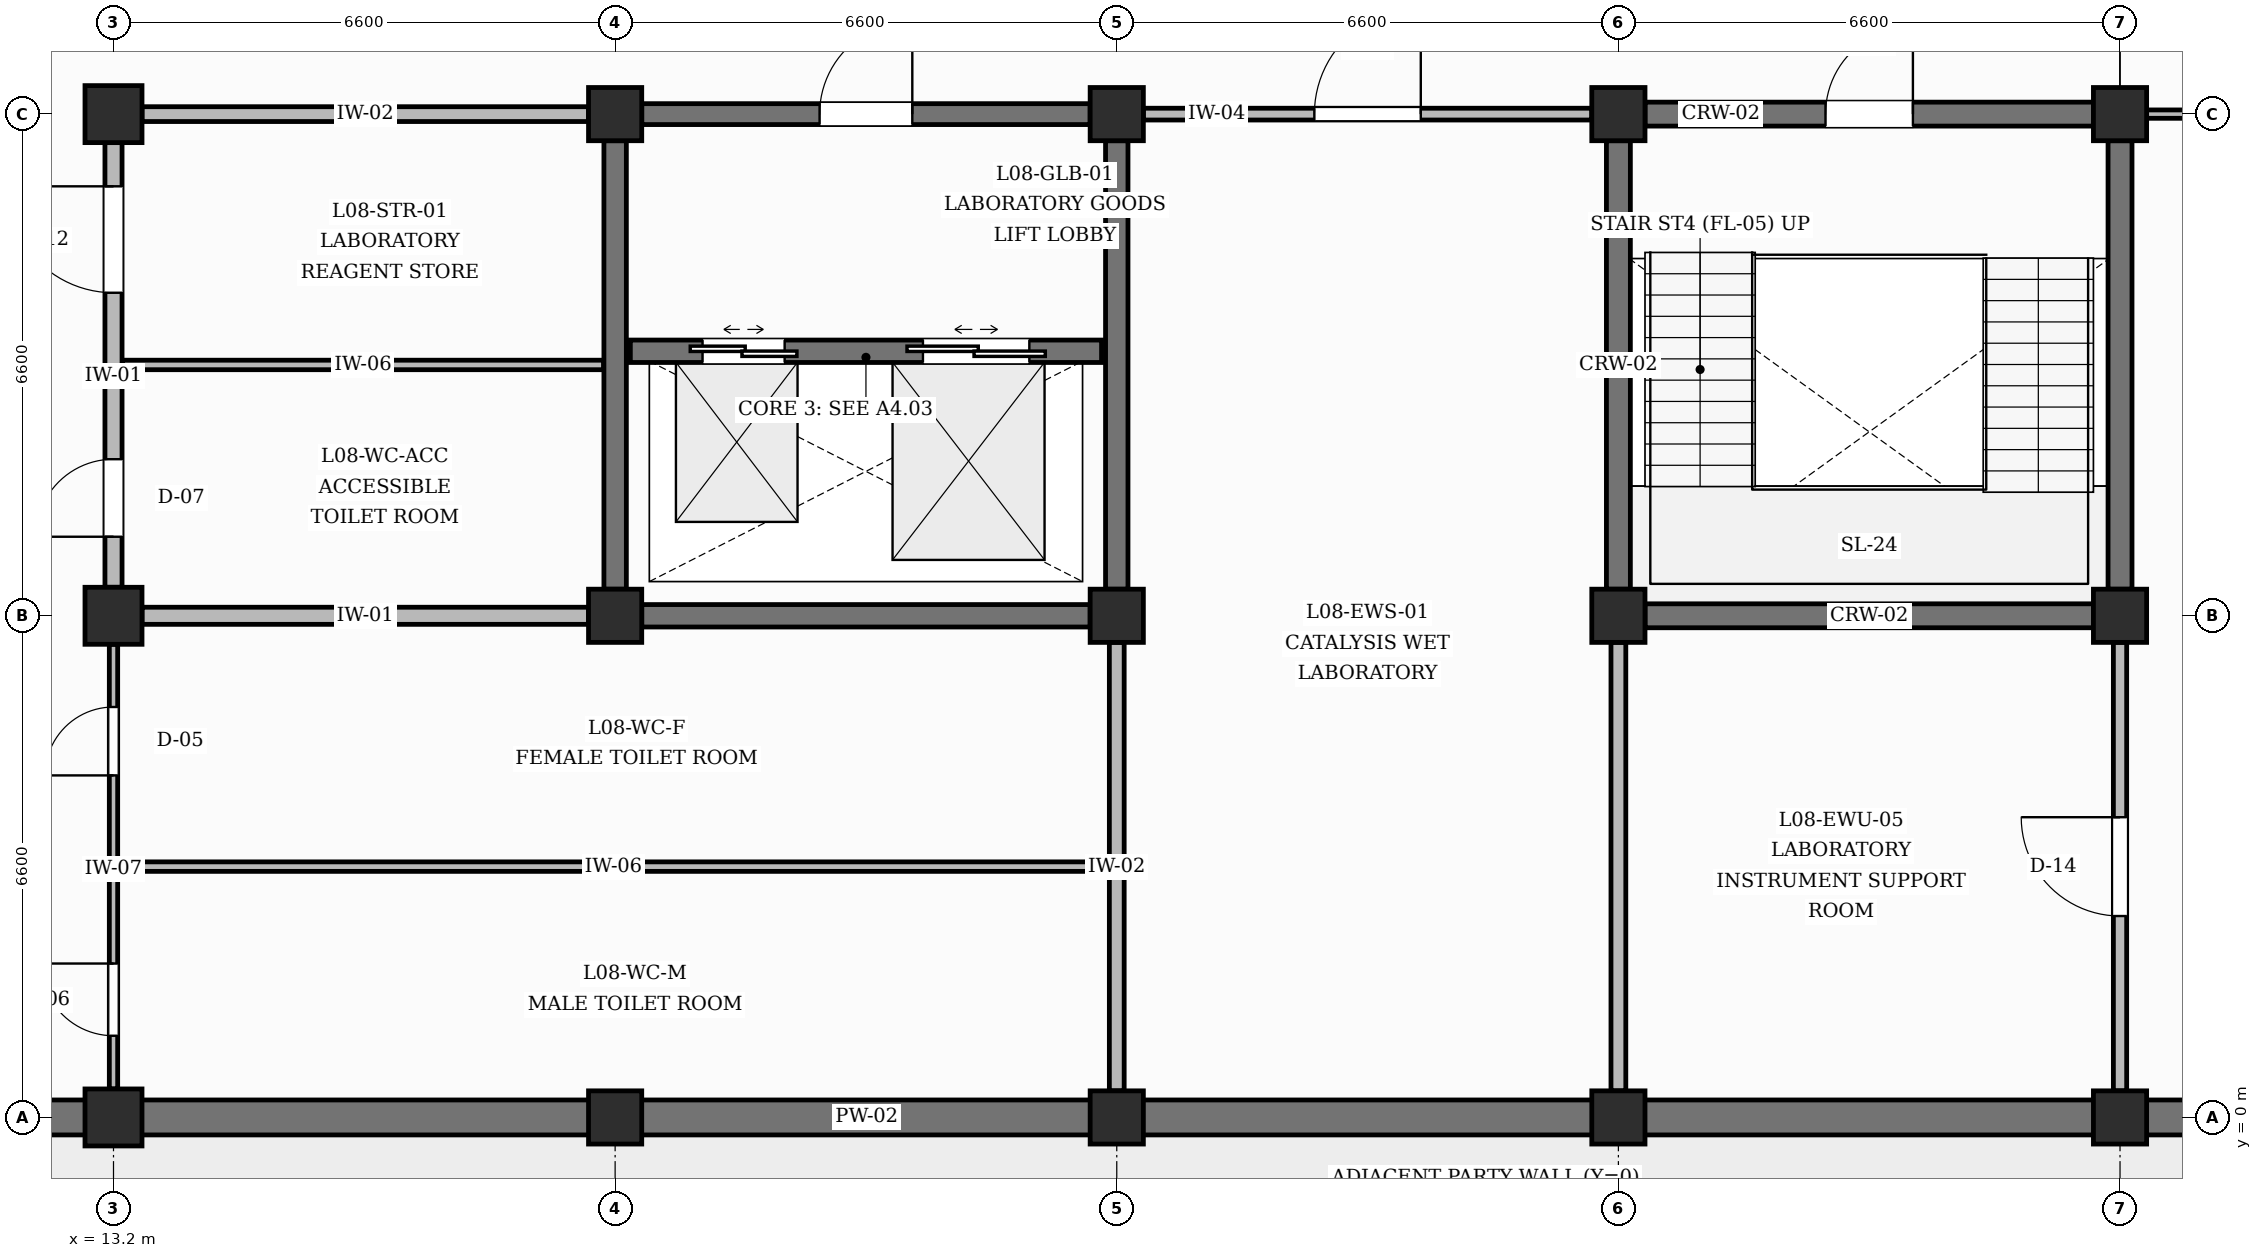
"""IFC4 building model, lengths in metres.
Left out: names, types, materials, properties, quantities, classifications, styles, units other than length and angle.
Written with IfcOpenShell. Run it as: python <this file> out.ifc"""

import sys

from ifc_helpers import new_model, si_unit, direction, frame, frame_2d, origin, origin_2d, place, context, subcontext, project, spatial, rectangle, extrude, element, fill, save


model = new_model("IFC4")
c1 = context("Model", 3, precision=1e-05, world=origin(), true_north=direction((0.0, 1.0)))
c2 = subcontext(c1, "Body", "Model", "MODEL_VIEW")
j1 = project(units=[si_unit("LENGTHUNIT", "METRE"), si_unit("PLANEANGLEUNIT", "RADIAN")], contexts=[c1])
p1 = place(None, origin())
s1 = spatial("IfcSite", under=j1, at=p1, CompositionType="ELEMENT")
p2 = place(p1, origin())
s2 = spatial("IfcBuilding", under=s1, at=p2, CompositionType="ELEMENT")
p3 = place(p2, frame((0.0, 0.0, 35.4)))
s3 = spatial("IfcBuildingStorey", under=s2, at=p3, CompositionType="ELEMENT", Elevation=35.4)
for number, where, z_axis, x_axis in (
    (1, (13.2, 0.0, 0.0), (0.0, 0.0, 1.0), (1.0, 0.0, 0.0)),
    (2, (13.2, 6.6, 0.0), (0.0, 0.0, 1.0), (1.0, 0.0, 0.0)),
    (3, (13.2, 13.2, 0.0), (0.0, 0.0, 1.0), (1.0, 0.0, 0.0)),
):
    element("IfcColumn", number, at=place(p3, frame(where, z_axis=z_axis, x_axis=x_axis)), inside=s3, PredefinedType="COLUMN", context=c2, shape_type="SweptSolid", body=[
        extrude(rectangle(XDim=0.75, YDim=0.75, at=origin_2d()), origin(), (0.0, 0.0, 1.0), 4.2),
    ])
for number, where, z_axis, x_axis in (
    (4, (19.8, 0.0, 0.0), (0.0, 0.0, 1.0), (1.0, 0.0, 0.0)),
    (5, (19.8, 6.6, 0.0), (0.0, 0.0, 1.0), (1.0, 0.0, 0.0)),
    (6, (19.8, 13.2, 0.0), (0.0, 0.0, 1.0), (1.0, 0.0, 0.0)),
    (7, (26.4, 0.0, 0.0), (0.0, 0.0, 1.0), (1.0, 0.0, 0.0)),
    (8, (26.4, 6.6, 0.0), (0.0, 0.0, 1.0), (1.0, 0.0, 0.0)),
    (9, (26.4, 13.2, 0.0), (0.0, 0.0, 1.0), (1.0, 0.0, 0.0)),
    (10, (33.0, 0.0, 0.0), (0.0, 0.0, 1.0), (1.0, 0.0, 0.0)),
    (11, (33.0, 6.6, 0.0), (0.0, 0.0, 1.0), (1.0, 0.0, 0.0)),
    (12, (33.0, 13.2, 0.0), (0.0, 0.0, 1.0), (1.0, 0.0, 0.0)),
    (13, (39.6, 0.0, 0.0), (0.0, 0.0, 1.0), (1.0, 0.0, 0.0)),
    (14, (39.6, 6.6, 0.0), (0.0, 0.0, 1.0), (1.0, 0.0, 0.0)),
    (15, (39.6, 13.2, 0.0), (0.0, 0.0, 1.0), (1.0, 0.0, 0.0)),
):
    element("IfcColumn", number, at=place(p3, frame(where, z_axis=z_axis, x_axis=x_axis)), inside=s3, PredefinedType="COLUMN", context=c2, shape_type="SweptSolid", body=[
        extrude(rectangle(XDim=0.7, YDim=0.7, at=origin_2d()), origin(), (0.0, 0.0, 1.0), 4.2),
    ])
p4 = place(p3, frame((6.975, 0.0, 0.0), z_axis=(0.0, 0.0, 1.0), x_axis=(1.0, 0.0, 0.0)))
e16 = element("IfcWall", 16, at=p4, inside=s3, PredefinedType="SOLIDWALL", context=c2, shape_type="SweptSolid", body=[
    extrude(rectangle(XDim=5.85, YDim=0.46, at=frame_2d((2.925, 0.0))), origin(), (0.0, 0.0, 1.0), 3.28),
])
p5 = place(p3, frame((13.575, 0.0, 0.0), z_axis=(0.0, 0.0, 1.0), x_axis=(1.0, 0.0, 0.0)))
e17 = element("IfcWall", 17, at=p5, inside=s3, PredefinedType="SOLIDWALL", context=c2, shape_type="SweptSolid", body=[
    extrude(rectangle(XDim=5.875, YDim=0.46, at=frame_2d((2.938, 0.0))), origin(), (0.0, 0.0, 1.0), 3.28),
])
p6 = place(p3, frame((20.15, 0.0, 0.0), z_axis=(0.0, 0.0, 1.0), x_axis=(1.0, 0.0, 0.0)))
e18 = element("IfcWall", 18, at=p6, inside=s3, PredefinedType="SOLIDWALL", context=c2, shape_type="SweptSolid", body=[
    extrude(rectangle(XDim=5.9, YDim=0.46, at=frame_2d((2.95, 0.0))), origin(), (0.0, 0.0, 1.0), 3.28),
])
for number, where, z_axis, x_axis in (
    (19, (26.75, 0.0, 0.0), (0.0, 0.0, 1.0), (1.0, 0.0, 0.0)),
    (20, (33.35, 0.0, 0.0), (0.0, 0.0, 1.0), (1.0, 0.0, 0.0)),
):
    element("IfcWall", number, at=place(p3, frame(where, z_axis=z_axis, x_axis=x_axis)), inside=s3, PredefinedType="SOLIDWALL", context=c2, shape_type="SweptSolid", body=[
        extrude(rectangle(XDim=5.9, YDim=0.46, at=frame_2d((2.95, 0.0))), origin(), (0.0, 0.0, 1.0), 3.28),
    ])
p7 = place(p3, frame((39.95, 0.0, 0.0), z_axis=(0.0, 0.0, 1.0), x_axis=(1.0, 0.0, 0.0)))
e21 = element("IfcWall", 21, at=p7, inside=s3, PredefinedType="SOLIDWALL", context=c2, shape_type="SweptSolid", body=[
    extrude(rectangle(XDim=5.9, YDim=0.46, at=frame_2d((2.95, 0.0))), origin(), (0.0, 0.0, 1.0), 3.28),
])
p8 = place(p3, frame((33.35, 6.6, 0.0), z_axis=(0.0, 0.0, 1.0), x_axis=(1.0, 0.0, 0.0)))
e22 = element("IfcWall", 22, at=p8, inside=s3, PredefinedType="SHEAR", context=c2, shape_type="SweptSolid", body=[
    extrude(rectangle(XDim=5.9, YDim=0.315, at=frame_2d((2.95, 0.0))), origin(), (0.0, 0.0, 1.0), 3.18),
])
p9 = place(p3, frame((33.35, 13.2, 0.0), z_axis=(0.0, 0.0, 1.0), x_axis=(1.0, 0.0, 0.0)))
e23 = element("IfcWall", 23, at=p9, inside=s3, PredefinedType="SHEAR", context=c2, shape_type="SweptSolid", body=[
    extrude(rectangle(XDim=5.9, YDim=0.315, at=frame_2d((2.95, 0.0))), origin(), (0.0, 0.0, 1.0), 3.18),
])
p10 = place(p9, frame((2.375, 0.0, 0.0)))
e24 = element("IfcOpeningElement", 24, at=p10, cuts=e23, PredefinedType="OPENING", context=c2, shape_type="SweptSolid", body=[
    extrude(rectangle(XDim=1.15, YDim=2.2, at=frame_2d((0.575, 1.1))), frame((0.0, 0.167, 0.0), z_axis=(0.0, -1.0, 0.0), x_axis=(1.0, 0.0, 0.0)), (0.0, 0.0, 1.0), 0.335),
])
for number, where, z_axis, x_axis in (
    (25, (33.0, 6.95, 0.0), (0.0, 0.0, 1.0), (0.0, 1.0, 0.0)),
    (26, (39.6, 6.95, 0.0), (0.0, 0.0, 1.0), (0.0, 1.0, 0.0)),
):
    element("IfcWall", number, at=place(p3, frame(where, z_axis=z_axis, x_axis=x_axis)), inside=s3, PredefinedType="SHEAR", context=c2, shape_type="SweptSolid", body=[
        extrude(rectangle(XDim=5.9, YDim=0.315, at=frame_2d((2.95, 0.0))), origin(), (0.0, 0.0, 1.0), 3.18),
    ])
for number, where, z_axis, x_axis in (
    (27, (20.15, 6.6, 0.0), (0.0, 0.0, 1.0), (1.0, 0.0, 0.0)),
    (28, (19.8, 6.95, 0.0), (0.0, 0.0, 1.0), (0.0, 1.0, 0.0)),
    (29, (26.4, 6.95, 0.0), (0.0, 0.0, 1.0), (0.0, 1.0, 0.0)),
):
    element("IfcWall", number, at=place(p3, frame(where, z_axis=z_axis, x_axis=x_axis)), inside=s3, PredefinedType="SHEAR", context=c2, shape_type="SweptSolid", body=[
        extrude(rectangle(XDim=5.9, YDim=0.295, at=frame_2d((2.95, 0.0))), origin(), (0.0, 0.0, 1.0), 3.18),
    ])
p11 = place(p3, frame((20.15, 13.2, 0.0), z_axis=(0.0, 0.0, 1.0), x_axis=(1.0, 0.0, 0.0)))
e30 = element("IfcWall", 30, at=p11, inside=s3, PredefinedType="SHEAR", context=c2, shape_type="SweptSolid", body=[
    extrude(rectangle(XDim=5.9, YDim=0.275, at=frame_2d((2.95, 0.0))), origin(), (0.0, 0.0, 1.0), 3.18),
])
p12 = place(p11, frame((2.34, 0.0, 0.0)))
e31 = element("IfcOpeningElement", 31, at=p12, cuts=e30, PredefinedType="OPENING", context=c2, shape_type="SweptSolid", body=[
    extrude(rectangle(XDim=1.22, YDim=2.15, at=frame_2d((0.61, 1.075))), frame((0.0, 0.147, 0.0), z_axis=(0.0, -1.0, 0.0), x_axis=(1.0, 0.0, 0.0)), (0.0, 0.0, 1.0), 0.295),
])
p13 = place(p3, frame((20.0, 10.08, 0.0), z_axis=(0.0, 0.0, 1.0), x_axis=(1.0, 0.0, 0.0)))
e32 = element("IfcWall", 32, at=p13, inside=s3, PredefinedType="SHEAR", context=c2, shape_type="SweptSolid", body=[
    extrude(rectangle(XDim=6.2, YDim=0.295, at=frame_2d((3.1, 0.0))), origin(), (0.0, 0.0, 1.0), 3.88),
])
p14 = place(p13, frame((0.95, 0.0, 0.0)))
e33 = element("IfcOpeningElement", 33, at=p14, cuts=e32, PredefinedType="OPENING", context=c2, shape_type="SweptSolid", body=[
    extrude(rectangle(XDim=1.08, YDim=2.15, at=frame_2d((0.54, 1.075))), frame((0.0, 0.157, 0.0), z_axis=(0.0, -1.0, 0.0), x_axis=(1.0, 0.0, 0.0)), (0.0, 0.0, 1.0), 0.315),
])
p15 = place(p13, frame((3.85, 0.0, 0.0)))
e34 = element("IfcOpeningElement", 34, at=p15, cuts=e32, PredefinedType="OPENING", context=c2, shape_type="SweptSolid", body=[
    extrude(rectangle(XDim=1.4, YDim=2.35, at=frame_2d((0.7, 1.175))), frame((0.0, 0.157, 0.0), z_axis=(0.0, -1.0, 0.0), x_axis=(1.0, 0.0, 0.0)), (0.0, 0.0, 1.0), 0.315),
])
p16 = place(p3, frame((13.2, 0.375, 0.0), z_axis=(0.0, 0.0, 1.0), x_axis=(0.0, 1.0, 0.0)))
e35 = element("IfcWall", 35, at=p16, inside=s3, PredefinedType="PARTITIONING", context=c2, shape_type="SweptSolid", body=[
    extrude(rectangle(XDim=5.85, YDim=0.11, at=frame_2d((2.925, 0.0))), origin(), (0.0, 0.0, 1.0), 3.18),
])
p17 = place(p16, frame((0.7, 0.0, 0.0)))
e36 = element("IfcOpeningElement", 36, at=p17, cuts=e35, PredefinedType="OPENING", context=c2, shape_type="SweptSolid", body=[
    extrude(rectangle(XDim=0.95, YDim=2.1, at=frame_2d((0.475, 1.05))), frame((0.0, 0.065, 0.0), z_axis=(0.0, -1.0, 0.0), x_axis=(1.0, 0.0, 0.0)), (0.0, 0.0, 1.0), 0.13),
])
p18 = place(p16, frame((4.125, 0.0, 0.0)))
e37 = element("IfcOpeningElement", 37, at=p18, cuts=e35, PredefinedType="OPENING", context=c2, shape_type="SweptSolid", body=[
    extrude(rectangle(XDim=0.9, YDim=2.1, at=frame_2d((0.45, 1.05))), frame((0.0, 0.065, 0.0), z_axis=(0.0, -1.0, 0.0), x_axis=(1.0, 0.0, 0.0)), (0.0, 0.0, 1.0), 0.13),
])
p19 = place(p3, frame((26.4, 0.35, 0.0), z_axis=(0.0, 0.0, 1.0), x_axis=(0.0, 1.0, 0.0)))
e38 = element("IfcWall", 38, at=p19, inside=s3, PredefinedType="PARTITIONING", context=c2, shape_type="SweptSolid", body=[
    extrude(rectangle(XDim=5.9, YDim=0.195, at=frame_2d((2.95, 0.0))), origin(), (0.0, 0.0, 1.0), 3.18),
])
p20 = place(p3, frame((13.575, 6.6, 0.0), z_axis=(0.0, 0.0, 1.0), x_axis=(1.0, 0.0, 0.0)))
e39 = element("IfcWall", 39, at=p20, inside=s3, PredefinedType="PARTITIONING", context=c2, shape_type="SweptSolid", body=[
    extrude(rectangle(XDim=5.875, YDim=0.225, at=frame_2d((2.938, 0.0))), origin(), (0.0, 0.0, 1.0), 3.18),
])
p21 = place(p3, frame((13.2, 6.975, 0.0), z_axis=(0.0, 0.0, 1.0), x_axis=(0.0, 1.0, 0.0)))
e40 = element("IfcWall", 40, at=p21, inside=s3, PredefinedType="PARTITIONING", context=c2, shape_type="SweptSolid", body=[
    extrude(rectangle(XDim=5.85, YDim=0.225, at=frame_2d((2.925, 0.0))), origin(), (0.0, 0.0, 1.0), 3.18),
])
p22 = place(p21, frame((0.665, 0.0, 0.0)))
e41 = element("IfcOpeningElement", 41, at=p22, cuts=e40, PredefinedType="OPENING", context=c2, shape_type="SweptSolid", body=[
    extrude(rectangle(XDim=1.02, YDim=2.15, at=frame_2d((0.51, 1.075))), frame((0.0, 0.123, 0.0), z_axis=(0.0, -1.0, 0.0), x_axis=(1.0, 0.0, 0.0)), (0.0, 0.0, 1.0), 0.245),
])
p23 = place(p21, frame((3.875, 0.0, 0.0)))
e42 = element("IfcOpeningElement", 42, at=p23, cuts=e40, PredefinedType="OPENING", context=c2, shape_type="SweptSolid", body=[
    extrude(rectangle(XDim=1.4, YDim=2.25, at=frame_2d((0.7, 1.125))), frame((0.0, 0.123, 0.0), z_axis=(0.0, -1.0, 0.0), x_axis=(1.0, 0.0, 0.0)), (0.0, 0.0, 1.0), 0.245),
])
p24 = place(p3, frame((13.575, 13.2, 0.0), z_axis=(0.0, 0.0, 1.0), x_axis=(1.0, 0.0, 0.0)))
e43 = element("IfcWall", 43, at=p24, inside=s3, PredefinedType="PARTITIONING", context=c2, shape_type="SweptSolid", body=[
    extrude(rectangle(XDim=5.875, YDim=0.195, at=frame_2d((2.938, 0.0))), origin(), (0.0, 0.0, 1.0), 3.18),
])
p25 = place(p3, frame((33.0, 0.35, 0.0), z_axis=(0.0, 0.0, 1.0), x_axis=(0.0, 1.0, 0.0)))
e44 = element("IfcWall", 44, at=p25, inside=s3, PredefinedType="PARTITIONING", context=c2, shape_type="SweptSolid", body=[
    extrude(rectangle(XDim=5.9, YDim=0.195, at=frame_2d((2.95, 0.0))), origin(), (0.0, 0.0, 1.0), 3.18),
])
p26 = place(p3, frame((26.75, 13.2, 0.0), z_axis=(0.0, 0.0, 1.0), x_axis=(1.0, 0.0, 0.0)))
e45 = element("IfcWall", 45, at=p26, inside=s3, PredefinedType="PARTITIONING", context=c2, shape_type="SweptSolid", body=[
    extrude(rectangle(XDim=5.9, YDim=0.155, at=frame_2d((2.95, 0.0))), origin(), (0.0, 0.0, 1.0), 3.18),
])
p27 = place(p26, frame((2.25, 0.0, 0.0)))
e46 = element("IfcOpeningElement", 46, at=p27, cuts=e45, PredefinedType="OPENING", context=c2, shape_type="SweptSolid", body=[
    extrude(rectangle(XDim=1.4, YDim=2.25, at=frame_2d((0.7, 1.125))), frame((0.0, 0.087, 0.0), z_axis=(0.0, -1.0, 0.0), x_axis=(1.0, 0.0, 0.0)), (0.0, 0.0, 1.0), 0.175),
])
p28 = place(p3, frame((39.6, 0.35, 0.0), z_axis=(0.0, 0.0, 1.0), x_axis=(0.0, 1.0, 0.0)))
e47 = element("IfcWall", 47, at=p28, inside=s3, PredefinedType="PARTITIONING", context=c2, shape_type="SweptSolid", body=[
    extrude(rectangle(XDim=5.9, YDim=0.175, at=frame_2d((2.95, 0.0))), origin(), (0.0, 0.0, 1.0), 3.18),
])
p29 = place(p28, frame((2.3, 0.0, 0.0)))
e48 = element("IfcOpeningElement", 48, at=p29, cuts=e47, PredefinedType="OPENING", context=c2, shape_type="SweptSolid", body=[
    extrude(rectangle(XDim=1.3, YDim=2.3, at=frame_2d((0.65, 1.15))), frame((0.0, 0.097, 0.0), z_axis=(0.0, -1.0, 0.0), x_axis=(1.0, 0.0, 0.0)), (0.0, 0.0, 1.0), 0.195),
])
p30 = place(p3, frame((39.95, 13.2, 0.0), z_axis=(0.0, 0.0, 1.0), x_axis=(1.0, 0.0, 0.0)))
e49 = element("IfcWall", 49, at=p30, inside=s3, PredefinedType="PARTITIONING", context=c2, shape_type="SweptSolid", body=[
    extrude(rectangle(XDim=5.9, YDim=0.11, at=frame_2d((2.95, 0.0))), origin(), (0.0, 0.0, 1.0), 3.18),
])
p31 = place(p30, frame((2.275, 0.0, 0.0)))
e50 = element("IfcOpeningElement", 50, at=p31, cuts=e49, PredefinedType="OPENING", context=c2, shape_type="SweptSolid", body=[
    extrude(rectangle(XDim=1.35, YDim=2.3, at=frame_2d((0.675, 1.15))), frame((0.0, 0.065, 0.0), z_axis=(0.0, -1.0, 0.0), x_axis=(1.0, 0.0, 0.0)), (0.0, 0.0, 1.0), 0.13),
])
p32 = place(p3, frame((13.26, 3.3, 0.0), z_axis=(0.0, 0.0, 1.0), x_axis=(1.0, 0.0, 0.0)))
e51 = element("IfcWall", 51, at=p32, inside=s3, PredefinedType="PARTITIONING", context=c2, shape_type="SweptSolid", body=[
    extrude(rectangle(XDim=13.038, YDim=0.125, at=frame_2d((6.519, 0.0))), origin(), (0.0, 0.0, 1.0), 3.88),
])
p33 = place(p3, frame((13.317, 9.9, 0.0), z_axis=(0.0, 0.0, 1.0), x_axis=(1.0, 0.0, 0.0)))
e52 = element("IfcWall", 52, at=p33, inside=s3, PredefinedType="PARTITIONING", context=c2, shape_type="SweptSolid", body=[
    extrude(rectangle(XDim=6.33, YDim=0.125, at=frame_2d((3.165, 0.0))), origin(), (0.0, 0.0, 1.0), 3.88),
])
p34 = place(p10, origin())
e53 = element("IfcDoor", 53, at=p34, inside=s3, OperationType="SINGLE_SWING_RIGHT", PredefinedType="DOOR", context=c2, shape_type="SweptSolid", body=[
    extrude(rectangle(XDim=1.15, YDim=2.2, at=frame_2d((0.575, 1.1))), frame((0.0, 0.025, 0.0), z_axis=(0.0, -1.0, 0.0), x_axis=(1.0, 0.0, 0.0)), (0.0, 0.0, 1.0), 0.05),
])
fill(e24, e53)
p35 = place(p14, origin())
e54 = element("IfcDoor", 54, at=p35, inside=s3, OperationType="DOUBLE_DOOR_SLIDING", PredefinedType="USERDEFINED", context=c2, shape_type="SweptSolid", body=[
    extrude(rectangle(XDim=1.08, YDim=2.15, at=frame_2d((0.54, 1.075))), frame((0.0, 0.025, 0.0), z_axis=(0.0, -1.0, 0.0), x_axis=(1.0, 0.0, 0.0)), (0.0, 0.0, 1.0), 0.05),
])
fill(e33, e54)
p36 = place(p15, origin())
e55 = element("IfcDoor", 55, at=p36, inside=s3, OperationType="DOUBLE_DOOR_SLIDING", PredefinedType="USERDEFINED", context=c2, shape_type="SweptSolid", body=[
    extrude(rectangle(XDim=1.4, YDim=2.35, at=frame_2d((0.7, 1.175))), frame((0.0, 0.025, 0.0), z_axis=(0.0, -1.0, 0.0), x_axis=(1.0, 0.0, 0.0)), (0.0, 0.0, 1.0), 0.05),
])
fill(e34, e55)
p37 = place(p12, origin())
e56 = element("IfcDoor", 56, at=p37, inside=s3, OperationType="SINGLE_SWING_RIGHT", PredefinedType="DOOR", context=c2, shape_type="SweptSolid", body=[
    extrude(rectangle(XDim=1.22, YDim=2.15, at=frame_2d((0.61, 1.075))), frame((0.0, 0.025, 0.0), z_axis=(0.0, -1.0, 0.0), x_axis=(1.0, 0.0, 0.0)), (0.0, 0.0, 1.0), 0.05),
])
fill(e31, e56)
p38 = place(p17, origin())
e57 = element("IfcDoor", 57, at=p38, inside=s3, OperationType="SINGLE_SWING_RIGHT", PredefinedType="DOOR", context=c2, shape_type="SweptSolid", body=[
    extrude(rectangle(XDim=0.95, YDim=2.1, at=frame_2d((0.475, 1.05))), frame((0.0, 0.025, 0.0), z_axis=(0.0, -1.0, 0.0), x_axis=(1.0, 0.0, 0.0)), (0.0, 0.0, 1.0), 0.05),
])
fill(e36, e57)
p39 = place(p18, origin())
e58 = element("IfcDoor", 58, at=p39, inside=s3, OperationType="SINGLE_SWING_LEFT", PredefinedType="DOOR", context=c2, shape_type="SweptSolid", body=[
    extrude(rectangle(XDim=0.9, YDim=2.1, at=frame_2d((0.45, 1.05))), frame((0.0, 0.025, 0.0), z_axis=(0.0, -1.0, 0.0), x_axis=(1.0, 0.0, 0.0)), (0.0, 0.0, 1.0), 0.05),
])
fill(e37, e58)
p40 = place(p22, origin())
e59 = element("IfcDoor", 59, at=p40, inside=s3, OperationType="SINGLE_SWING_LEFT", PredefinedType="DOOR", context=c2, shape_type="SweptSolid", body=[
    extrude(rectangle(XDim=1.02, YDim=2.15, at=frame_2d((0.51, 1.075))), frame((0.0, 0.025, 0.0), z_axis=(0.0, -1.0, 0.0), x_axis=(1.0, 0.0, 0.0)), (0.0, 0.0, 1.0), 0.05),
])
fill(e41, e59)
p41 = place(p23, origin())
e60 = element("IfcDoor", 60, at=p41, inside=s3, OperationType="SINGLE_SWING_RIGHT", PredefinedType="DOOR", context=c2, shape_type="SweptSolid", body=[
    extrude(rectangle(XDim=1.4, YDim=2.25, at=frame_2d((0.7, 1.125))), frame((0.0, 0.025, 0.0), z_axis=(0.0, -1.0, 0.0), x_axis=(1.0, 0.0, 0.0)), (0.0, 0.0, 1.0), 0.05),
])
fill(e42, e60)
p42 = place(p27, origin())
e61 = element("IfcDoor", 61, at=p42, inside=s3, OperationType="SINGLE_SWING_RIGHT", PredefinedType="DOOR", context=c2, shape_type="SweptSolid", body=[
    extrude(rectangle(XDim=1.4, YDim=2.25, at=frame_2d((0.7, 1.125))), frame((0.0, 0.025, 0.0), z_axis=(0.0, -1.0, 0.0), x_axis=(1.0, 0.0, 0.0)), (0.0, 0.0, 1.0), 0.05),
])
fill(e46, e61)
p43 = place(p29, origin())
e62 = element("IfcDoor", 62, at=p43, inside=s3, OperationType="SINGLE_SWING_RIGHT", PredefinedType="DOOR", context=c2, shape_type="SweptSolid", body=[
    extrude(rectangle(XDim=1.3, YDim=2.3, at=frame_2d((0.65, 1.15))), frame((0.0, 0.025, 0.0), z_axis=(0.0, -1.0, 0.0), x_axis=(1.0, 0.0, 0.0)), (0.0, 0.0, 1.0), 0.05),
])
fill(e48, e62)
save(model, sys.argv[1])
